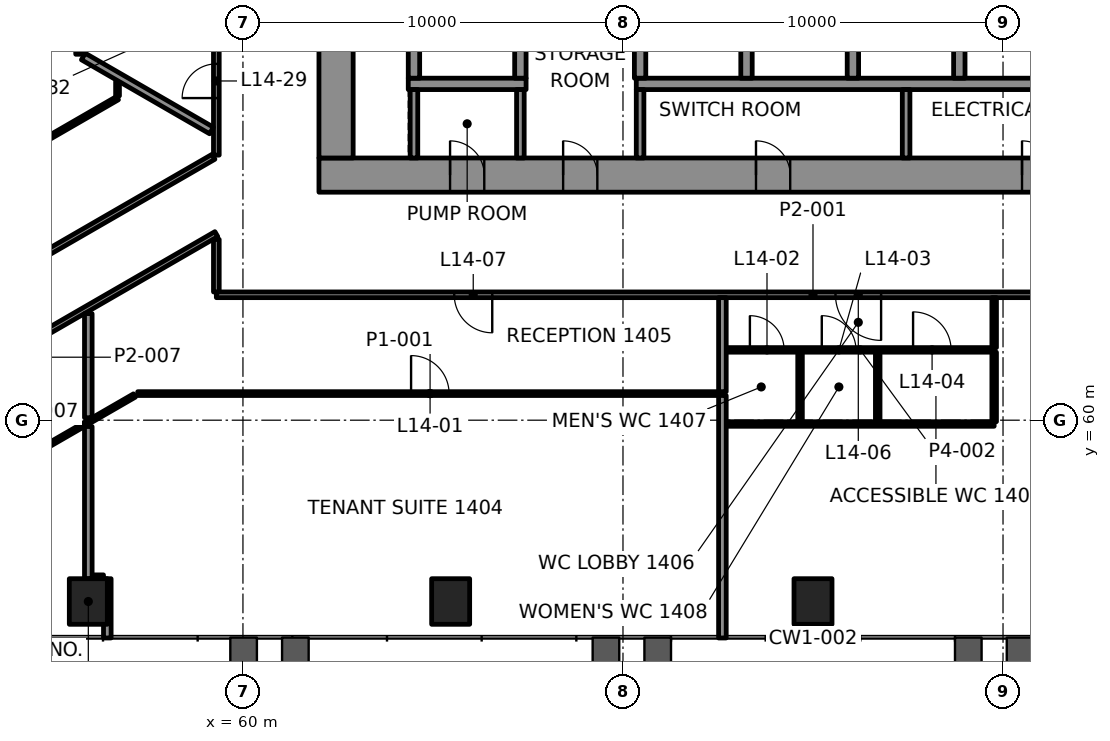
"""IFC4 building model, lengths in metres.
Left out: names, types, materials, properties, quantities, classifications, styles, units other than length and angle.
Written with IfcOpenShell. Run it as: python <this file> out.ifc"""

import sys

from ifc_helpers import new_model, si_unit, direction, frame, frame_2d, origin, origin_2d, place, context, subcontext, project, spatial, rectangle, extrude, element, fill, save


model = new_model("IFC4")
c1 = context("Model", 3, precision=1e-05, world=origin(), true_north=direction((0.0, 1.0)))
c2 = subcontext(c1, "Body", "Model", "MODEL_VIEW")
j1 = project(units=[si_unit("LENGTHUNIT", "METRE"), si_unit("PLANEANGLEUNIT", "RADIAN")], contexts=[c1])
p1 = place(None, origin())
s1 = spatial("IfcSite", under=j1, at=p1, CompositionType="ELEMENT")
p2 = place(p1, origin())
s2 = spatial("IfcBuilding", under=s1, at=p2, CompositionType="ELEMENT")
p3 = place(p2, frame((0.0, 0.0, 65.2)))
s3 = spatial("IfcBuildingStorey", under=s2, at=p3, CompositionType="ELEMENT", Elevation=65.2)
for number, where, z_axis, x_axis in (
    (1, (55.931, 55.229, -0.0), (0.0, 0.0, 1.0), (1.0, 0.0, 0.0)),
    (2, (65.466, 55.229, -0.0), (0.0, 0.0, 1.0), (1.0, 0.0, 0.0)),
    (3, (75.0, 55.229, -0.0), (0.0, 0.0, 1.0), (1.0, 0.0, 0.0)),
):
    element("IfcColumn", number, at=place(p3, frame(where, z_axis=z_axis, x_axis=x_axis)), inside=s3, PredefinedType="COLUMN", context=c2, shape_type="SweptSolid", body=[
        extrude(rectangle(XDim=1.0, YDim=1.2, at=origin_2d()), origin(), (0.0, 0.0, 1.0), 4.2),
    ])
p4 = place(p3, frame((62.0, 66.45, 0.0), z_axis=(0.0, 0.0, 1.0), x_axis=(1.0, 0.0, 0.0)))
e4 = element("IfcWall", 4, at=p4, inside=s3, PredefinedType="SHEAR", context=c2, shape_type="SweptSolid", body=[
    extrude(rectangle(XDim=26.0, YDim=0.9, at=frame_2d((13.0, 0.0))), origin(), (0.0, 0.0, 1.0), 4.0),
])
p5 = place(p4, frame((3.45, 0.0, 0.0)))
e5 = element("IfcOpeningElement", 5, at=p5, cuts=e4, PredefinedType="OPENING", context=c2, shape_type="SweptSolid", body=[
    extrude(rectangle(XDim=0.9, YDim=2.1, at=frame_2d((0.45, 1.05))), frame((0.0, 0.46, 0.0), z_axis=(0.0, -1.0, 0.0), x_axis=(1.0, 0.0, 0.0)), (0.0, 0.0, 1.0), 0.92),
])
p6 = place(p4, frame((6.425, 0.0, 0.0)))
e6 = element("IfcOpeningElement", 6, at=p6, cuts=e4, PredefinedType="OPENING", context=c2, shape_type="SweptSolid", body=[
    extrude(rectangle(XDim=0.9, YDim=2.1, at=frame_2d((0.45, 1.05))), frame((0.0, 0.46, 0.0), z_axis=(0.0, -1.0, 0.0), x_axis=(1.0, 0.0, 0.0)), (0.0, 0.0, 1.0), 0.92),
])
p7 = place(p4, frame((11.5, 0.0, 0.0)))
e7 = element("IfcOpeningElement", 7, at=p7, cuts=e4, PredefinedType="OPENING", context=c2, shape_type="SweptSolid", body=[
    extrude(rectangle(XDim=0.9, YDim=2.1, at=frame_2d((0.45, 1.05))), frame((0.0, 0.46, 0.0), z_axis=(0.0, -1.0, 0.0), x_axis=(1.0, 0.0, 0.0)), (0.0, 0.0, 1.0), 0.92),
])
p8 = place(p4, frame((18.5, 0.0, 0.0)))
e8 = element("IfcOpeningElement", 8, at=p8, cuts=e4, PredefinedType="OPENING", context=c2, shape_type="SweptSolid", body=[
    extrude(rectangle(XDim=0.9, YDim=2.1, at=frame_2d((0.45, 1.05))), frame((0.0, 0.46, 0.0), z_axis=(0.0, -1.0, 0.0), x_axis=(1.0, 0.0, 0.0)), (0.0, 0.0, 1.0), 0.92),
])
p9 = place(p4, frame((23.325, 0.0, 0.0)))
e9 = element("IfcOpeningElement", 9, at=p9, cuts=e4, PredefinedType="OPENING", context=c2, shape_type="SweptSolid", body=[
    extrude(rectangle(XDim=0.9, YDim=2.1, at=frame_2d((0.45, 1.05))), frame((0.0, 0.46, 0.0), z_axis=(0.0, -1.0, 0.0), x_axis=(1.0, 0.0, 0.0)), (0.0, 0.0, 1.0), 0.92),
])
p10 = place(p3, frame((62.45, 66.9, 0.0), z_axis=(0.0, 0.0, 1.0), x_axis=(0.0, 1.0, 0.0)))
e10 = element("IfcWall", 10, at=p10, inside=s3, PredefinedType="SHEAR", context=c2, shape_type="SweptSolid", body=[
    extrude(rectangle(XDim=16.2, YDim=0.9, at=frame_2d((8.1, 0.0))), origin(), (0.0, 0.0, 1.0), 4.0),
])
p11 = place(p10, frame((5.5, 0.0, 0.0)))
e11 = element("IfcOpeningElement", 11, at=p11, cuts=e10, PredefinedType="OPENING", context=c2, shape_type="SweptSolid", body=[
    extrude(rectangle(XDim=1.8, YDim=2.1, at=frame_2d((0.9, 1.05))), frame((0.0, 0.46, 0.0), z_axis=(0.0, -1.0, 0.0), x_axis=(1.0, 0.0, 0.0)), (0.0, 0.0, 1.0), 0.92),
])
p12 = place(p3, frame((64.35, 68.85, 0.0), z_axis=(0.0, 0.0, 1.0), x_axis=(1.0, 0.0, 0.0)))
e12 = element("IfcWall", 12, at=p12, inside=s3, PredefinedType="SHEAR", context=c2, shape_type="SweptSolid", body=[
    extrude(rectangle(XDim=3.1, YDim=0.3, at=frame_2d((1.55, 0.0))), origin(), (0.0, 0.0, 1.0), 4.0),
])
p13 = place(p3, frame((70.35, 68.85, 0.0), z_axis=(0.0, 0.0, 1.0), x_axis=(1.0, 0.0, 0.0)))
e13 = element("IfcWall", 13, at=p13, inside=s3, PredefinedType="SHEAR", context=c2, shape_type="SweptSolid", body=[
    extrude(rectangle(XDim=16.75, YDim=0.3, at=frame_2d((8.375, 0.0))), origin(), (0.0, 0.0, 1.0), 4.0),
])
for number, where, z_axis, x_axis in (
    (14, (64.5, 69.0, 0.0), (0.0, 0.0, 1.0), (0.0, 1.0, 0.0)),
    (15, (67.3, 69.0, 0.0), (0.0, 0.0, 1.0), (0.0, 1.0, 0.0)),
    (16, (70.45, 69.0, 0.0), (0.0, 0.0, 1.0), (0.0, 1.0, 0.0)),
    (17, (73.25, 69.0, 0.0), (0.0, 0.0, 1.0), (0.0, 1.0, 0.0)),
    (18, (76.05, 69.0, 0.0), (0.0, 0.0, 1.0), (0.0, 1.0, 0.0)),
    (19, (78.85, 69.0, 0.0), (0.0, 0.0, 1.0), (0.0, 1.0, 0.0)),
):
    element("IfcWall", number, at=place(p3, frame(where, z_axis=z_axis, x_axis=x_axis)), inside=s3, PredefinedType="SHEAR", context=c2, shape_type="SweptSolid", body=[
        extrude(rectangle(XDim=2.6, YDim=0.3, at=frame_2d((1.3, 0.0))), origin(), (0.0, 0.0, 1.0), 4.0),
    ])
p14 = place(p3, frame((56.031, 55.829, 0.0), z_axis=(0.0, 0.0, 1.0), x_axis=(1.0, 0.0, 0.0)))
e20 = element("IfcWall", 20, at=p14, inside=s3, PredefinedType="PARTITIONING", context=c2, shape_type="SweptSolid", body=[
    extrude(rectangle(XDim=0.3, YDim=0.2, at=frame_2d((0.15, 0.0))), origin(), (0.0, 0.0, 1.0), 3.4),
])
p15 = place(p3, frame((72.717, 59.9, 0.0), z_axis=(0.0, 0.0, 1.0), x_axis=(1.0, 0.0, 0.0)))
e21 = element("IfcWall", 21, at=p15, inside=s3, PredefinedType="PARTITIONING", context=c2, shape_type="SweptSolid", body=[
    extrude(rectangle(XDim=7.05, YDim=0.12, at=frame_2d((3.525, 0.0))), origin(), (0.0, 0.0, 1.0), 3.4),
])
p16 = place(p3, frame((57.232, 60.7, 0.0), z_axis=(0.0, 0.0, 1.0), x_axis=(1.0, 0.0, 0.0)))
e22 = element("IfcWall", 22, at=p16, inside=s3, PredefinedType="PARTITIONING", context=c2, shape_type="SweptSolid", body=[
    extrude(rectangle(XDim=15.385, YDim=0.1, at=frame_2d((7.692, 0.0))), origin(), (0.0, 0.0, 1.0), 3.4),
])
p17 = place(p16, frame((7.192, 0.0, 0.0)))
e23 = element("IfcOpeningElement", 23, at=p17, cuts=e22, PredefinedType="OPENING", context=c2, shape_type="SweptSolid", body=[
    extrude(rectangle(XDim=1.0, YDim=2.1, at=frame_2d((0.5, 1.05))), frame((0.0, 0.06, 0.0), z_axis=(0.0, -1.0, 0.0), x_axis=(1.0, 0.0, 0.0)), (0.0, 0.0, 1.0), 0.12),
])
p18 = place(p3, frame((72.716, 61.85, 0.0), z_axis=(0.0, 0.0, 1.0), x_axis=(1.0, 0.0, 0.0)))
e24 = element("IfcWall", 24, at=p18, inside=s3, PredefinedType="PARTITIONING", context=c2, shape_type="SweptSolid", body=[
    extrude(rectangle(XDim=7.051, YDim=0.12, at=frame_2d((3.525, 0.0))), origin(), (0.0, 0.0, 1.0), 3.4),
])
p19 = place(p18, frame((0.623, 0.0, 0.0)))
e25 = element("IfcOpeningElement", 25, at=p19, cuts=e24, PredefinedType="OPENING", context=c2, shape_type="SweptSolid", body=[
    extrude(rectangle(XDim=0.9, YDim=2.1, at=frame_2d((0.45, 1.05))), frame((0.0, 0.07, 0.0), z_axis=(0.0, -1.0, 0.0), x_axis=(1.0, 0.0, 0.0)), (0.0, 0.0, 1.0), 0.14),
])
p20 = place(p18, frame((2.515, 0.0, 0.0)))
e26 = element("IfcOpeningElement", 26, at=p20, cuts=e24, PredefinedType="OPENING", context=c2, shape_type="SweptSolid", body=[
    extrude(rectangle(XDim=0.9, YDim=2.1, at=frame_2d((0.45, 1.05))), frame((0.0, 0.07, 0.0), z_axis=(0.0, -1.0, 0.0), x_axis=(1.0, 0.0, 0.0)), (0.0, 0.0, 1.0), 0.14),
])
p21 = place(p18, frame((4.917, 0.0, 0.0)))
e27 = element("IfcOpeningElement", 27, at=p21, cuts=e24, PredefinedType="OPENING", context=c2, shape_type="SweptSolid", body=[
    extrude(rectangle(XDim=1.0, YDim=2.1, at=frame_2d((0.5, 1.05))), frame((0.0, 0.07, 0.0), z_axis=(0.0, -1.0, 0.0), x_axis=(1.0, 0.0, 0.0)), (0.0, 0.0, 1.0), 0.14),
])
p22 = place(p3, frame((90.699, 63.3, 0.0), z_axis=(0.0, 0.0, 1.0), x_axis=(-1.0, 0.0, 0.0)))
e28 = element("IfcWall", 28, at=p22, inside=s3, PredefinedType="PARTITIONING", context=c2, shape_type="SweptSolid", body=[
    extrude(rectangle(XDim=31.399, YDim=0.15, at=frame_2d((15.7, 0.0))), origin(), (0.0, 0.0, 1.0), 3.4),
])
p23 = place(p22, frame((4.968, 0.0, 0.0)))
e29 = element("IfcOpeningElement", 29, at=p23, cuts=e28, PredefinedType="OPENING", context=c2, shape_type="SweptSolid", body=[
    extrude(rectangle(XDim=1.2, YDim=2.1, at=frame_2d((0.6, 1.05))), frame((0.0, 0.085, 0.0), z_axis=(0.0, -1.0, 0.0), x_axis=(1.0, 0.0, 0.0)), (0.0, 0.0, 1.0), 0.17),
])
p24 = place(p22, frame((13.908, 0.0, 0.0)))
e30 = element("IfcOpeningElement", 30, at=p24, cuts=e28, PredefinedType="OPENING", context=c2, shape_type="SweptSolid", body=[
    extrude(rectangle(XDim=1.2, YDim=2.1, at=frame_2d((0.6, 1.05))), frame((0.0, 0.085, 0.0), z_axis=(0.0, -1.0, 0.0), x_axis=(1.0, 0.0, 0.0)), (0.0, 0.0, 1.0), 0.17),
])
p25 = place(p22, frame((24.14, 0.0, 0.0)))
e31 = element("IfcOpeningElement", 31, at=p25, cuts=e28, PredefinedType="OPENING", context=c2, shape_type="SweptSolid", body=[
    extrude(rectangle(XDim=1.0, YDim=2.1, at=frame_2d((0.5, 1.05))), frame((0.0, 0.085, 0.0), z_axis=(0.0, -1.0, 0.0), x_axis=(1.0, 0.0, 0.0)), (0.0, 0.0, 1.0), 0.17),
])
p26 = place(p3, frame((50.819, 56.998, 0.0), z_axis=(0.0, 0.0, 1.0), x_axis=(0.866023631393, 0.50000306986, 0.0)))
e32 = element("IfcWall", 32, at=p26, inside=s3, PredefinedType="PARTITIONING", context=c2, shape_type="SweptSolid", body=[
    extrude(rectangle(XDim=7.305, YDim=0.1, at=frame_2d((3.653, 0.0))), origin(), (0.0, 0.0, 1.0), 3.4),
])
p27 = place(p26, frame((2.602, 0.0, 0.0)))
e33 = element("IfcOpeningElement", 33, at=p27, cuts=e32, PredefinedType="OPENING", context=c2, shape_type="SweptSolid", body=[
    extrude(rectangle(XDim=0.9, YDim=2.1, at=frame_2d((0.45, 1.05))), frame((0.0, 0.06, 0.0), z_axis=(0.0, -1.0, 0.0), x_axis=(1.0, 0.0, 0.0)), (0.0, 0.0, 1.0), 0.12),
])
p28 = place(p3, frame((59.3, 64.896, 0.0), z_axis=(0.0, 0.0, 1.0), x_axis=(-0.86602302899, -0.500004113243, 0.0)))
e34 = element("IfcWall", 34, at=p28, inside=s3, PredefinedType="PARTITIONING", context=c2, shape_type="SweptSolid", body=[
    extrude(rectangle(XDim=12.956, YDim=0.15, at=frame_2d((6.478, 0.0))), origin(), (0.0, 0.0, 1.0), 3.247),
])
p29 = place(p28, frame((7.821, 0.0, 0.0)))
e35 = element("IfcOpeningElement", 35, at=p29, cuts=e34, PredefinedType="OPENING", context=c2, shape_type="SweptSolid", body=[
    extrude(rectangle(XDim=1.0, YDim=2.1, at=frame_2d((0.5, 1.05))), frame((0.0, 0.085, 0.0), z_axis=(0.0, -1.0, 0.0), x_axis=(1.0, 0.0, 0.0)), (0.0, 0.0, 1.0), 0.17),
])
p30 = place(p3, frame((47.178, 59.976, 0.0), z_axis=(0.0, 0.0, 1.0), x_axis=(0.866019280802, 0.500010605167, 0.0)))
e36 = element("IfcWall", 36, at=p30, inside=s3, PredefinedType="PARTITIONING", context=c2, shape_type="SweptSolid", body=[
    extrude(rectangle(XDim=13.91, YDim=0.15, at=frame_2d((6.955, 0.0))), origin(), (0.0, 0.0, 1.0), 3.4),
])
p31 = place(p30, frame((6.455, 0.0, 0.0)))
e37 = element("IfcOpeningElement", 37, at=p31, cuts=e36, PredefinedType="OPENING", context=c2, shape_type="SweptSolid", body=[
    extrude(rectangle(XDim=1.0, YDim=2.1, at=frame_2d((0.5, 1.05))), frame((0.0, 0.085, 0.0), z_axis=(0.0, -1.0, 0.0), x_axis=(1.0, 0.0, 0.0)), (0.0, 0.0, 1.0), 0.17),
])
p32 = place(p3, frame((56.7, 68.476, 0.0), z_axis=(0.0, 0.0, 1.0), x_axis=(-0.866026152489, -0.499998703203, 0.0)))
e38 = element("IfcWall", 38, at=p32, inside=s3, PredefinedType="PARTITIONING", context=c2, shape_type="SweptSolid", body=[
    extrude(rectangle(XDim=15.096, YDim=0.1, at=frame_2d((7.548, 0.0))), origin(), (0.0, 0.0, 1.0), 3.4),
])
p33 = place(p32, frame((6.948, 0.0, 0.0)))
e39 = element("IfcOpeningElement", 39, at=p33, cuts=e38, PredefinedType="OPENING", context=c2, shape_type="SweptSolid", body=[
    extrude(rectangle(XDim=1.2, YDim=2.1, at=frame_2d((0.6, 1.05))), frame((0.0, 0.06, 0.0), z_axis=(0.0, -1.0, 0.0), x_axis=(1.0, 0.0, 0.0)), (0.0, 0.0, 1.0), 0.12),
])
p34 = place(p3, frame((79.767, 59.96, 0.0), z_axis=(0.0, 0.0, 1.0), x_axis=(0.0, 1.0, 0.0)))
e40 = element("IfcWall", 40, at=p34, inside=s3, PredefinedType="PARTITIONING", context=c2, shape_type="SweptSolid", body=[
    extrude(rectangle(XDim=1.83, YDim=0.12, at=frame_2d((0.915, 0.0))), origin(), (0.0, 0.0, 1.0), 3.4),
])
for number, where, z_axis, x_axis in (
    (41, (76.703, 59.96, 0.0), (0.0, 0.0, 1.0), (0.0, 1.0, 0.0)),
    (42, (74.659, 59.96, 0.0), (0.0, 0.0, 1.0), (0.0, 1.0, 0.0)),
):
    element("IfcWall", number, at=place(p3, frame(where, z_axis=z_axis, x_axis=x_axis)), inside=s3, PredefinedType="PARTITIONING", context=c2, shape_type="SweptSolid", body=[
        extrude(rectangle(XDim=1.83, YDim=0.12, at=frame_2d((0.915, 0.0))), origin(), (0.0, 0.0, 1.0), 3.4),
    ])
p35 = place(p3, frame((72.616, 54.269, 0.0), z_axis=(0.0, 0.0, 1.0), x_axis=(0.0, 1.0, 0.0)))
e43 = element("IfcWall", 43, at=p35, inside=s3, PredefinedType="PARTITIONING", context=c2, shape_type="SweptSolid", body=[
    extrude(rectangle(XDim=6.381, YDim=0.2, at=frame_2d((3.19, 0.0))), origin(), (0.0, 0.0, 1.0), 3.165),
])
p36 = place(p3, frame((59.3, 63.375, 0.0), z_axis=(0.0, 0.0, 1.0), x_axis=(0.0, 1.0, 0.0)))
e44 = element("IfcWall", 44, at=p36, inside=s3, PredefinedType="PARTITIONING", context=c2, shape_type="SweptSolid", body=[
    extrude(rectangle(XDim=1.385, YDim=0.15, at=frame_2d((0.692, 0.0))), origin(), (0.0, 0.0, 1.0), 3.247),
])
p37 = place(p3, frame((59.3, 66.975, 0.0), z_axis=(0.0, 0.0, 1.0), x_axis=(0.0, 1.0, 0.0)))
e45 = element("IfcWall", 45, at=p37, inside=s3, PredefinedType="PARTITIONING", context=c2, shape_type="SweptSolid", body=[
    extrude(rectangle(XDim=19.725, YDim=0.15, at=frame_2d((9.862, 0.0))), origin(), (0.0, 0.0, 1.0), 3.4),
])
p38 = place(p37, frame((1.502, 0.0, 0.0)))
e46 = element("IfcOpeningElement", 46, at=p38, cuts=e45, PredefinedType="OPENING", context=c2, shape_type="SweptSolid", body=[
    extrude(rectangle(XDim=0.9, YDim=2.1, at=frame_2d((0.45, 1.05))), frame((0.0, 0.085, 0.0), z_axis=(0.0, -1.0, 0.0), x_axis=(1.0, 0.0, 0.0)), (0.0, 0.0, 1.0), 0.17),
])
p39 = place(p37, frame((4.254, 0.0, 0.0)))
e47 = element("IfcOpeningElement", 47, at=p39, cuts=e45, PredefinedType="OPENING", context=c2, shape_type="SweptSolid", body=[
    extrude(rectangle(XDim=0.9, YDim=2.1, at=frame_2d((0.45, 1.05))), frame((0.0, 0.085, 0.0), z_axis=(0.0, -1.0, 0.0), x_axis=(1.0, 0.0, 0.0)), (0.0, 0.0, 1.0), 0.17),
])
p40 = place(p37, frame((7.007, 0.0, 0.0)))
e48 = element("IfcOpeningElement", 48, at=p40, cuts=e45, PredefinedType="OPENING", context=c2, shape_type="SweptSolid", body=[
    extrude(rectangle(XDim=0.9, YDim=2.1, at=frame_2d((0.45, 1.05))), frame((0.0, 0.085, 0.0), z_axis=(0.0, -1.0, 0.0), x_axis=(1.0, 0.0, 0.0)), (0.0, 0.0, 1.0), 0.17),
])
p41 = place(p3, frame((56.7, 68.534, 0.0), z_axis=(0.0, 0.0, 1.0), x_axis=(0.0, 1.0, 0.0)))
e49 = element("IfcWall", 49, at=p41, inside=s3, PredefinedType="PARTITIONING", context=c2, shape_type="SweptSolid", body=[
    extrude(rectangle(XDim=0.372, YDim=0.1, at=frame_2d((0.186, 0.0))), origin(), (0.0, 0.0, 1.0), 3.4),
])
p42 = place(p3, frame((56.431, 54.269, 0.0), z_axis=(0.0, 0.0, 1.0), x_axis=(0.0, 1.0, 0.0)))
e50 = element("IfcWall", 50, at=p42, inside=s3, PredefinedType="PARTITIONING", context=c2, shape_type="SweptSolid", body=[
    extrude(rectangle(XDim=1.56, YDim=0.2, at=frame_2d((0.78, 0.0))), origin(), (0.0, 0.0, 1.0), 3.165),
])
p43 = place(p3, frame((55.931, 55.829, 0.0), z_axis=(0.0, 0.0, 1.0), x_axis=(0.0, 1.0, 0.0)))
e51 = element("IfcWall", 51, at=p43, inside=s3, PredefinedType="PARTITIONING", context=c2, shape_type="SweptSolid", body=[
    extrude(rectangle(XDim=4.005, YDim=0.2, at=frame_2d((2.002, 0.0))), origin(), (0.0, 0.0, 1.0), 3.4),
])
p44 = place(p3, frame((55.7, 69.63, 0.0), z_axis=(0.0, 0.0, 1.0), x_axis=(0.0, 1.0, 0.0)))
e52 = element("IfcWall", 52, at=p44, inside=s3, PredefinedType="PARTITIONING", context=c2, shape_type="SweptSolid", body=[
    extrude(rectangle(XDim=8.256, YDim=0.2, at=frame_2d((4.128, 0.0))), origin(), (0.0, 0.0, 1.0), 3.4),
])
p45 = place(p3, frame((59.173, 67.623, 0.0), z_axis=(0.0, 0.0, 1.0), x_axis=(-0.866000809756, 0.500042595688, 0.0)))
e53 = element("IfcWall", 53, at=p45, inside=s3, PredefinedType="PARTITIONING", context=c2, shape_type="SweptSolid", body=[
    extrude(rectangle(XDim=3.895, YDim=0.2, at=frame_2d((1.947, 0.0))), origin(), (0.0, 0.0, 1.0), 3.4),
])
p46 = place(p3, frame((72.616, 60.75, 0.0), z_axis=(0.0, 0.0, 1.0), x_axis=(0.0, 1.0, 0.0)))
e54 = element("IfcWall", 54, at=p46, inside=s3, PredefinedType="PARTITIONING", context=c2, shape_type="SweptSolid", body=[
    extrude(rectangle(XDim=2.475, YDim=0.2, at=frame_2d((1.238, 0.0))), origin(), (0.0, 0.0, 1.0), 3.4),
])
p47 = place(p3, frame((79.767, 61.91, 0.0), z_axis=(0.0, 0.0, 1.0), x_axis=(0.0, 1.0, 0.0)))
e55 = element("IfcWall", 55, at=p47, inside=s3, PredefinedType="PARTITIONING", context=c2, shape_type="SweptSolid", body=[
    extrude(rectangle(XDim=1.315, YDim=0.12, at=frame_2d((0.657, 0.0))), origin(), (0.0, 0.0, 1.0), 3.4),
])
p48 = place(p3, frame((55.931, 60.065, 0.0), z_axis=(0.0, 0.0, 1.0), x_axis=(0.0, 1.0, 0.0)))
e56 = element("IfcWall", 56, at=p48, inside=s3, PredefinedType="PARTITIONING", context=c2, shape_type="SweptSolid", body=[
    extrude(rectangle(XDim=2.74, YDim=0.2, at=frame_2d((1.37, 0.0))), origin(), (0.0, 0.0, 1.0), 3.4),
])
for number, where, z_axis, x_axis in (
    (57, (64.5, 66.9, 0.0), (0.0, 0.0, 1.0), (0.0, 1.0, 0.0)),
    (58, (67.3, 66.9, 0.0), (0.0, 0.0, 1.0), (0.0, 1.0, 0.0)),
    (59, (70.45, 66.9, 0.0), (0.0, 0.0, 1.0), (0.0, 1.0, 0.0)),
    (60, (77.45, 66.9, 0.0), (0.0, 0.0, 1.0), (0.0, 1.0, 0.0)),
):
    element("IfcWall", number, at=place(p3, frame(where, z_axis=z_axis, x_axis=x_axis)), inside=s3, PredefinedType="PARTITIONING", context=c2, shape_type="SweptSolid", body=[
        extrude(rectangle(XDim=1.8, YDim=0.2, at=frame_2d((0.9, 0.0))), origin(), (0.0, 0.0, 1.0), 4.0),
    ])
p49 = place(p17, origin())
e61 = element("IfcDoor", 61, at=p49, inside=s3, OperationType="SINGLE_SWING_LEFT", PredefinedType="DOOR", context=c2, shape_type="SweptSolid", body=[
    extrude(rectangle(XDim=1.0, YDim=2.1, at=frame_2d((0.5, 1.05))), frame((0.0, 0.025, 0.0), z_axis=(0.0, -1.0, 0.0), x_axis=(1.0, 0.0, 0.0)), (0.0, 0.0, 1.0), 0.05),
])
fill(e23, e61)
p50 = place(p19, origin())
e62 = element("IfcDoor", 62, at=p50, inside=s3, OperationType="SINGLE_SWING_RIGHT", PredefinedType="DOOR", context=c2, shape_type="SweptSolid", body=[
    extrude(rectangle(XDim=0.9, YDim=2.1, at=frame_2d((0.45, 1.05))), frame((0.0, 0.025, 0.0), z_axis=(0.0, -1.0, 0.0), x_axis=(1.0, 0.0, 0.0)), (0.0, 0.0, 1.0), 0.05),
])
fill(e25, e62)
p51 = place(p20, origin())
e63 = element("IfcDoor", 63, at=p51, inside=s3, OperationType="SINGLE_SWING_LEFT", PredefinedType="DOOR", context=c2, shape_type="SweptSolid", body=[
    extrude(rectangle(XDim=0.9, YDim=2.1, at=frame_2d((0.45, 1.05))), frame((0.0, 0.025, 0.0), z_axis=(0.0, -1.0, 0.0), x_axis=(1.0, 0.0, 0.0)), (0.0, 0.0, 1.0), 0.05),
])
fill(e26, e63)
p52 = place(p21, origin())
e64 = element("IfcDoor", 64, at=p52, inside=s3, OperationType="SINGLE_SWING_RIGHT", PredefinedType="DOOR", context=c2, shape_type="SweptSolid", body=[
    extrude(rectangle(XDim=1.0, YDim=2.1, at=frame_2d((0.5, 1.05))), frame((0.0, 0.025, 0.0), z_axis=(0.0, -1.0, 0.0), x_axis=(1.0, 0.0, 0.0)), (0.0, 0.0, 1.0), 0.05),
])
fill(e27, e64)
p53 = place(p24, origin())
e65 = element("IfcDoor", 65, at=p53, inside=s3, OperationType="DOUBLE_DOOR_SINGLE_SWING", PredefinedType="DOOR", context=c2, shape_type="SweptSolid", body=[
    extrude(rectangle(XDim=1.2, YDim=2.1, at=frame_2d((0.6, 1.05))), frame((0.0, 0.025, 0.0), z_axis=(0.0, -1.0, 0.0), x_axis=(1.0, 0.0, 0.0)), (0.0, 0.0, 1.0), 0.05),
])
fill(e30, e65)
p54 = place(p25, origin())
e66 = element("IfcDoor", 66, at=p54, inside=s3, OperationType="SINGLE_SWING_LEFT", PredefinedType="DOOR", context=c2, shape_type="SweptSolid", body=[
    extrude(rectangle(XDim=1.0, YDim=2.1, at=frame_2d((0.5, 1.05))), frame((0.0, 0.025, 0.0), z_axis=(0.0, -1.0, 0.0), x_axis=(1.0, 0.0, 0.0)), (0.0, 0.0, 1.0), 0.05),
])
fill(e31, e66)
p55 = place(p38, origin())
e67 = element("IfcDoor", 67, at=p55, inside=s3, OperationType="SINGLE_SWING_LEFT", PredefinedType="DOOR", context=c2, shape_type="SweptSolid", body=[
    extrude(rectangle(XDim=0.9, YDim=2.1, at=frame_2d((0.45, 1.05))), frame((0.0, 0.025, 0.0), z_axis=(0.0, -1.0, 0.0), x_axis=(1.0, 0.0, 0.0)), (0.0, 0.0, 1.0), 0.05),
])
fill(e46, e67)
p56 = place(p5, origin())
e68 = element("IfcDoor", 68, at=p56, inside=s3, OperationType="SINGLE_SWING_LEFT", PredefinedType="DOOR", context=c2, shape_type="SweptSolid", body=[
    extrude(rectangle(XDim=0.9, YDim=2.1, at=frame_2d((0.45, 1.05))), frame((0.0, 0.17, 0.0), z_axis=(0.0, -1.0, 0.0), x_axis=(1.0, 0.0, 0.0)), (0.0, 0.0, 1.0), 0.34),
])
fill(e5, e68)
p57 = place(p6, origin())
e69 = element("IfcDoor", 69, at=p57, inside=s3, OperationType="SINGLE_SWING_RIGHT", PredefinedType="DOOR", context=c2, shape_type="SweptSolid", body=[
    extrude(rectangle(XDim=0.9, YDim=2.1, at=frame_2d((0.45, 1.05))), frame((0.0, 0.17, 0.0), z_axis=(0.0, -1.0, 0.0), x_axis=(1.0, 0.0, 0.0)), (0.0, 0.0, 1.0), 0.34),
])
fill(e6, e69)
p58 = place(p7, origin())
e70 = element("IfcDoor", 70, at=p58, inside=s3, OperationType="SINGLE_SWING_LEFT", PredefinedType="DOOR", context=c2, shape_type="SweptSolid", body=[
    extrude(rectangle(XDim=0.9, YDim=2.1, at=frame_2d((0.45, 1.05))), frame((0.0, 0.17, 0.0), z_axis=(0.0, -1.0, 0.0), x_axis=(1.0, 0.0, 0.0)), (0.0, 0.0, 1.0), 0.34),
])
fill(e7, e70)
p59 = place(p8, origin())
e71 = element("IfcDoor", 71, at=p59, inside=s3, OperationType="SINGLE_SWING_RIGHT", PredefinedType="DOOR", context=c2, shape_type="SweptSolid", body=[
    extrude(rectangle(XDim=0.9, YDim=2.1, at=frame_2d((0.45, 1.05))), frame((0.0, 0.17, 0.0), z_axis=(0.0, -1.0, 0.0), x_axis=(1.0, 0.0, 0.0)), (0.0, 0.0, 1.0), 0.34),
])
fill(e8, e71)
save(model, sys.argv[1])
